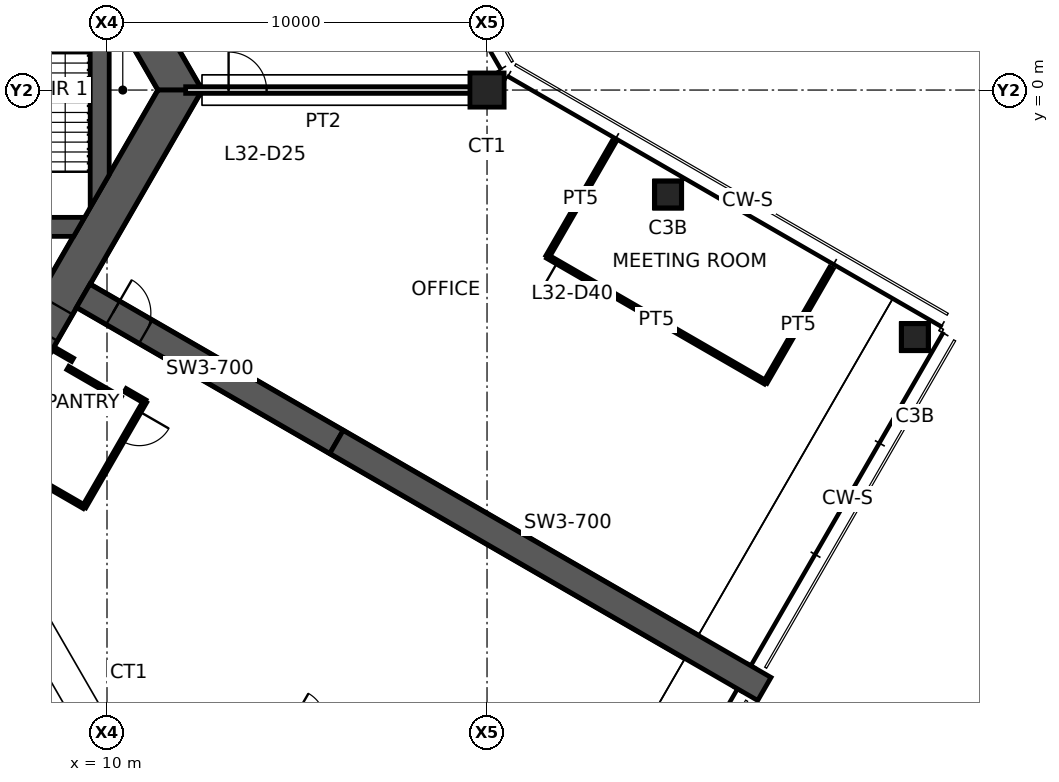
"""IFC4 building model, lengths in metres.
Left out: names, types, materials, properties, quantities, classifications, styles, units other than length and angle.
Written with IfcOpenShell. Run it as: python <this file> out.ifc"""

import sys

from ifc_helpers import new_model, si_unit, direction, frame, frame_2d, origin, origin_2d, place, context, subcontext, project, spatial, polyline, rectangle, hollow_rectangle, outline, extrude, element, fill, save


model = new_model("IFC4")
c1 = context("Model", 3, precision=1e-05, world=origin(), true_north=direction((0.0, 1.0)))
c2 = subcontext(c1, "Body", "Model", "MODEL_VIEW")
j1 = project(units=[si_unit("LENGTHUNIT", "METRE"), si_unit("PLANEANGLEUNIT", "RADIAN")], contexts=[c1])
p1 = place(None, origin())
s1 = spatial("IfcSite", under=j1, at=p1, CompositionType="ELEMENT")
p2 = place(p1, origin())
s2 = spatial("IfcBuilding", under=s1, at=p2, CompositionType="ELEMENT")
p3 = place(p2, frame((0.0, 0.0, 128.6)))
s3 = spatial("IfcBuildingStorey", under=s2, at=p3, CompositionType="ELEMENT", Elevation=128.6)
p4 = place(p3, frame((20.0, 0.0, 0.0), z_axis=(0.0, 0.0, 1.0), x_axis=(1.0, 0.0, 0.0)))
e1 = element("IfcColumn", 1, at=p4, inside=s3, PredefinedType="COLUMN", context=c2, shape_type="SweptSolid", body=[
    extrude(hollow_rectangle(XDim=0.9, YDim=0.9, WallThickness=0.07, at=origin_2d()), origin(), (0.0, 0.0, 1.0), 4.5),
])
for number, where, z_axis, x_axis in (
    (2, (24.763, -2.75, 0.0), (0.0, 0.0, 1.0), (1.0, 0.0, 0.0)),
    (3, (31.258, -6.5, 0.0), (0.0, 0.0, 1.0), (1.0, 0.0, 0.0)),
):
    element("IfcColumn", number, at=place(p3, frame(where, z_axis=z_axis, x_axis=x_axis)), inside=s3, PredefinedType="COLUMN", context=c2, shape_type="SweptSolid", body=[
        extrude(hollow_rectangle(XDim=0.7, YDim=0.7, WallThickness=0.036, at=origin_2d()), origin(), (0.0, 0.0, 1.0), 4.5),
    ])
p5 = place(p3, frame((11.922, 0.0, 0.0), z_axis=(0.0, 0.0, 1.0), x_axis=(-0.500004296715, 0.866022923061, 0.0)))
e4 = element("IfcWall", 4, at=p5, inside=s3, PredefinedType="SHEAR", context=c2, shape_type="SweptSolid", body=[
    extrude(outline(polyline([(-0.289, -0.5), (5.835, -0.5), (6.635, -0.5), (12.211, -0.5), (11.634, 0.5), (6.635, 0.5), (5.835, 0.5), (0.289, 0.5), (-0.289, -0.5)])), origin(), (0.0, 0.0, 1.0), 4.5),
])
p6 = place(p5, frame((5.835, 0.0, 0.0)))
e5 = element("IfcOpeningElement", 5, at=p6, cuts=e4, PredefinedType="OPENING", context=c2, shape_type="SweptSolid", body=[
    extrude(rectangle(XDim=0.8, YDim=2.1, at=frame_2d((0.4, 1.05))), frame((0.0, 0.51, 0.0), z_axis=(0.0, -1.0, 0.0), x_axis=(1.0, 0.0, 0.0)), (0.0, 0.0, 1.0), 1.02),
])
p7 = place(p3, frame((5.961, -10.325, 0.0), z_axis=(0.0, 0.0, 1.0), x_axis=(0.500004296715, 0.866022923061, 0.0)))
e6 = element("IfcWall", 6, at=p7, inside=s3, PredefinedType="SHEAR", context=c2, shape_type="SweptSolid", body=[
    extrude(outline(polyline([(-0.289, -0.5), (4.594, -0.5), (5.394, -0.5), (12.211, -0.5), (11.634, 0.5), (5.394, 0.5), (4.594, 0.5), (0.289, 0.5), (-0.289, -0.5)])), origin(), (0.0, 0.0, 1.0), 4.5),
])
p8 = place(p7, frame((4.594, 0.0, 0.0)))
e7 = element("IfcOpeningElement", 7, at=p8, cuts=e6, PredefinedType="OPENING", context=c2, shape_type="SweptSolid", body=[
    extrude(rectangle(XDim=0.8, YDim=2.1, at=frame_2d((0.4, 1.05))), frame((0.0, 0.51, 0.0), z_axis=(0.0, -1.0, 0.0), x_axis=(1.0, 0.0, 0.0)), (0.0, 0.0, 1.0), 1.02),
])
p9 = place(p3, frame((9.375, -5.413, 0.0), z_axis=(0.0, 0.0, 1.0), x_axis=(0.866032377459, -0.499987921047, 0.0)))
e8 = element("IfcWall", 8, at=p9, inside=s3, PredefinedType="SHEAR", context=c2, shape_type="SweptSolid", body=[
    extrude(rectangle(XDim=7.696, YDim=0.7, at=frame_2d((3.848, 0.0))), origin(), (0.0, 0.0, 1.0), 4.5),
])
p10 = place(p9, frame((0.9, 0.0, 0.0)))
e9 = element("IfcOpeningElement", 9, at=p10, cuts=e8, PredefinedType="OPENING", context=c2, shape_type="SweptSolid", body=[
    extrude(rectangle(XDim=1.0, YDim=2.1, at=frame_2d((0.5, 1.05))), frame((0.0, 0.36, 0.0), z_axis=(0.0, -1.0, 0.0), x_axis=(1.0, 0.0, 0.0)), (0.0, 0.0, 1.0), 0.72),
])
p11 = place(p3, frame((16.039, -9.26, 0.0), z_axis=(0.0, 0.0, 1.0), x_axis=(0.866024837091, -0.50000098154, 0.0)))
e10 = element("IfcWall", 10, at=p11, inside=s3, PredefinedType="SHEAR", context=c2, shape_type="SweptSolid", body=[
    extrude(rectangle(XDim=13.0, YDim=0.7, at=frame_2d((6.5, 0.0))), origin(), (0.0, 0.0, 1.0), 4.5),
])
p12 = place(p3, frame((1.35, -3.6, 0.0), z_axis=(0.0, 0.0, 1.0), x_axis=(1.0, 0.0, 0.0)))
e11 = element("IfcWall", 11, at=p12, inside=s3, PredefinedType="SHEAR", context=c2, shape_type="SweptSolid", body=[
    extrude(outline(polyline([(0.0, -0.25), (1.15, -0.25), (2.25, -0.25), (7.772, -0.25), (8.061, 0.25), (2.25, 0.25), (1.15, 0.25), (0.0, 0.25), (0.0, -0.25)])), origin(), (0.0, 0.0, 1.0), 4.5),
])
p13 = place(p12, frame((1.15, 0.0, 0.0)))
e12 = element("IfcOpeningElement", 12, at=p13, cuts=e11, PredefinedType="OPENING", context=c2, shape_type="SweptSolid", body=[
    extrude(rectangle(XDim=1.1, YDim=2.1, at=frame_2d((0.55, 1.05))), frame((0.0, 0.26, 0.0), z_axis=(0.0, -1.0, 0.0), x_axis=(1.0, 0.0, 0.0)), (0.0, 0.0, 1.0), 0.52),
])
p14 = place(p3, frame((9.808, -2.662, 0.0), z_axis=(0.0, 0.0, 1.0), x_axis=(0.0, 1.0, 0.0)))
e13 = element("IfcWall", 13, at=p14, inside=s3, PredefinedType="SHEAR", context=c2, shape_type="SweptSolid", body=[
    extrude(outline(polyline([(0.433, -0.25), (4.892, -0.25), (5.758, 0.25), (-0.433, 0.25), (0.433, -0.25)])), origin(), (0.0, 0.0, 1.0), 4.5),
])
p15 = place(p3, frame((12.07, 0.0, 0.0), z_axis=(0.0, 0.0, 1.0), x_axis=(1.0, 0.0, 0.0)))
e14 = element("IfcWall", 14, at=p15, inside=s3, PredefinedType="PARTITIONING", context=c2, shape_type="SweptSolid", body=[
    extrude(rectangle(XDim=7.93, YDim=0.175, at=frame_2d((3.965, 0.0))), origin(), (0.0, 0.0, 1.0), 3.65),
])
p16 = place(p15, frame((1.13, 0.0, 0.0)))
e15 = element("IfcOpeningElement", 15, at=p16, cuts=e14, PredefinedType="OPENING", context=c2, shape_type="SweptSolid", body=[
    extrude(rectangle(XDim=1.0, YDim=2.1, at=frame_2d((0.5, 1.05))), frame((0.0, 0.098, 0.0), z_axis=(0.0, -1.0, 0.0), x_axis=(1.0, 0.0, 0.0)), (0.0, 0.0, 1.0), 0.195),
])
p17 = place(p3, frame((21.592, -4.383, 0.0), z_axis=(0.0, 0.0, 1.0), x_axis=(0.500009906705, 0.86601968407, 0.0)))
e16 = element("IfcWall", 16, at=p17, inside=s3, PredefinedType="PARTITIONING", context=c2, shape_type="SweptSolid", body=[
    extrude(rectangle(XDim=3.48, YDim=0.1, at=frame_2d((1.74, 0.0))), origin(), (0.0, 0.0, 1.0), 3.55),
])
p18 = place(p3, frame((27.325, -7.693, 0.0), z_axis=(0.0, 0.0, 1.0), x_axis=(-0.866021597574, 0.500006592492, 0.0)))
e17 = element("IfcWall", 17, at=p18, inside=s3, PredefinedType="PARTITIONING", context=c2, shape_type="SweptSolid", body=[
    extrude(rectangle(XDim=6.62, YDim=0.1, at=frame_2d((3.31, 0.0))), origin(), (0.0, 0.0, 1.0), 3.55),
])
p19 = place(p18, frame((5.42, 0.0, 0.0)))
e18 = element("IfcOpeningElement", 18, at=p19, cuts=e17, PredefinedType="OPENING", context=c2, shape_type="SweptSolid", body=[
    extrude(rectangle(XDim=0.9, YDim=2.1, at=frame_2d((0.45, 1.05))), frame((0.0, 0.06, 0.0), z_axis=(0.0, -1.0, 0.0), x_axis=(1.0, 0.0, 0.0)), (0.0, 0.0, 1.0), 0.12),
])
p20 = place(p3, frame((29.06, -4.688, 0.0), z_axis=(0.0, 0.0, 1.0), x_axis=(-0.500020871164, -0.866013353477, 0.0)))
e19 = element("IfcWall", 19, at=p20, inside=s3, PredefinedType="PARTITIONING", context=c2, shape_type="SweptSolid", body=[
    extrude(rectangle(XDim=3.47, YDim=0.1, at=frame_2d((1.735, 0.0))), origin(), (0.0, 0.0, 1.0), 3.55),
])
p21 = place(p3, frame((8.592, -6.808, 0.0), z_axis=(0.0, 0.0, 1.0), x_axis=(0.865954211699, -0.50012328804, 0.0)))
e20 = element("IfcWall", 20, at=p21, inside=s3, PredefinedType="PARTITIONING", context=c2, shape_type="SweptSolid", body=[
    extrude(rectangle(XDim=0.58, YDim=0.1, at=frame_2d((0.29, 0.0))), origin(), (0.0, 0.0, 1.0), 3.55),
])
p22 = place(p3, frame((8.969, -7.315, 0.0), z_axis=(0.0, 0.0, 1.0), x_axis=(0.866094119867, -0.499880961361, 0.0)))
e21 = element("IfcWall", 21, at=p22, inside=s3, PredefinedType="PARTITIONING", context=c2, shape_type="SweptSolid", body=[
    extrude(rectangle(XDim=1.6, YDim=0.1, at=frame_2d((0.8, 0.0))), origin(), (0.0, 0.0, 1.0), 3.55),
])
p23 = place(p3, frame((9.4, -10.969, 0.0), z_axis=(0.0, 0.0, 1.0), x_axis=(-0.866018876994, 0.500011304563, 0.0)))
e22 = element("IfcWall", 22, at=p23, inside=s3, PredefinedType="PARTITIONING", context=c2, shape_type="SweptSolid", body=[
    extrude(rectangle(XDim=2.78, YDim=0.1, at=frame_2d((1.39, 0.0))), origin(), (0.0, 0.0, 1.0), 3.55),
])
p24 = place(p3, frame((10.48, -7.898, 0.0), z_axis=(0.0, 0.0, 1.0), x_axis=(0.866131372301, -0.499816412211, 0.0)))
e23 = element("IfcWall", 23, at=p24, inside=s3, PredefinedType="PARTITIONING", context=c2, shape_type="SweptSolid", body=[
    extrude(rectangle(XDim=0.6, YDim=0.1, at=frame_2d((0.3, 0.0))), origin(), (0.0, 0.0, 1.0), 3.55),
])
p25 = place(p3, frame((11.0, -8.198, 0.0), z_axis=(0.0, 0.0, 1.0), x_axis=(-0.499938187974, -0.866061088033, 0.0)))
e24 = element("IfcWall", 24, at=p25, inside=s3, PredefinedType="PARTITIONING", context=c2, shape_type="SweptSolid", body=[
    extrude(rectangle(XDim=3.2, YDim=0.1, at=frame_2d((1.6, 0.0))), origin(), (0.0, 0.0, 1.0), 3.55),
])
p26 = place(p25, frame((0.3, 0.0, 0.0)))
e25 = element("IfcOpeningElement", 25, at=p26, cuts=e24, PredefinedType="OPENING", context=c2, shape_type="SweptSolid", body=[
    extrude(rectangle(XDim=0.9, YDim=2.1, at=frame_2d((0.45, 1.05))), frame((0.0, 0.06, 0.0), z_axis=(0.0, -1.0, 0.0), x_axis=(1.0, 0.0, 0.0)), (0.0, 0.0, 1.0), 0.12),
])
p27 = place(p8, origin())
e26 = element("IfcDoor", 26, at=p27, inside=s3, OperationType="SINGLE_SWING_LEFT", PredefinedType="DOOR", context=c2, shape_type="SweptSolid", body=[
    extrude(rectangle(XDim=0.8, YDim=2.1, at=frame_2d((0.4, 1.05))), frame((0.0, 0.025, 0.0), z_axis=(0.0, -1.0, 0.0), x_axis=(1.0, 0.0, 0.0)), (0.0, 0.0, 1.0), 0.05),
])
fill(e7, e26)
p28 = place(p10, origin())
e27 = element("IfcDoor", 27, at=p28, inside=s3, OperationType="SINGLE_SWING_LEFT", PredefinedType="DOOR", context=c2, shape_type="SweptSolid", body=[
    extrude(rectangle(XDim=1.0, YDim=2.1, at=frame_2d((0.5, 1.05))), frame((0.0, 0.025, 0.0), z_axis=(0.0, -1.0, 0.0), x_axis=(1.0, 0.0, 0.0)), (0.0, 0.0, 1.0), 0.05),
])
fill(e9, e27)
p29 = place(p16, origin())
e28 = element("IfcDoor", 28, at=p29, inside=s3, OperationType="SINGLE_SWING_LEFT", PredefinedType="DOOR", context=c2, shape_type="SweptSolid", body=[
    extrude(rectangle(XDim=1.0, YDim=2.1, at=frame_2d((0.5, 1.05))), frame((0.0, 0.025, 0.0), z_axis=(0.0, -1.0, 0.0), x_axis=(1.0, 0.0, 0.0)), (0.0, 0.0, 1.0), 0.05),
])
fill(e15, e28)
p30 = place(p19, origin())
e29 = element("IfcDoor", 29, at=p30, inside=s3, OperationType="SINGLE_SWING_RIGHT", PredefinedType="DOOR", context=c2, shape_type="SweptSolid", body=[
    extrude(rectangle(XDim=0.9, YDim=2.1, at=frame_2d((0.45, 1.05))), frame((0.0, 0.025, 0.0), z_axis=(0.0, -1.0, 0.0), x_axis=(1.0, 0.0, 0.0)), (0.0, 0.0, 1.0), 0.05),
])
fill(e18, e29)
p31 = place(p26, origin())
e30 = element("IfcDoor", 30, at=p31, inside=s3, OperationType="SINGLE_SWING_LEFT", PredefinedType="DOOR", context=c2, shape_type="SweptSolid", body=[
    extrude(rectangle(XDim=0.9, YDim=2.1, at=frame_2d((0.45, 1.05))), frame((0.0, 0.025, 0.0), z_axis=(0.0, -1.0, 0.0), x_axis=(1.0, 0.0, 0.0)), (0.0, 0.0, 1.0), 0.05),
])
fill(e25, e30)
save(model, sys.argv[1])
